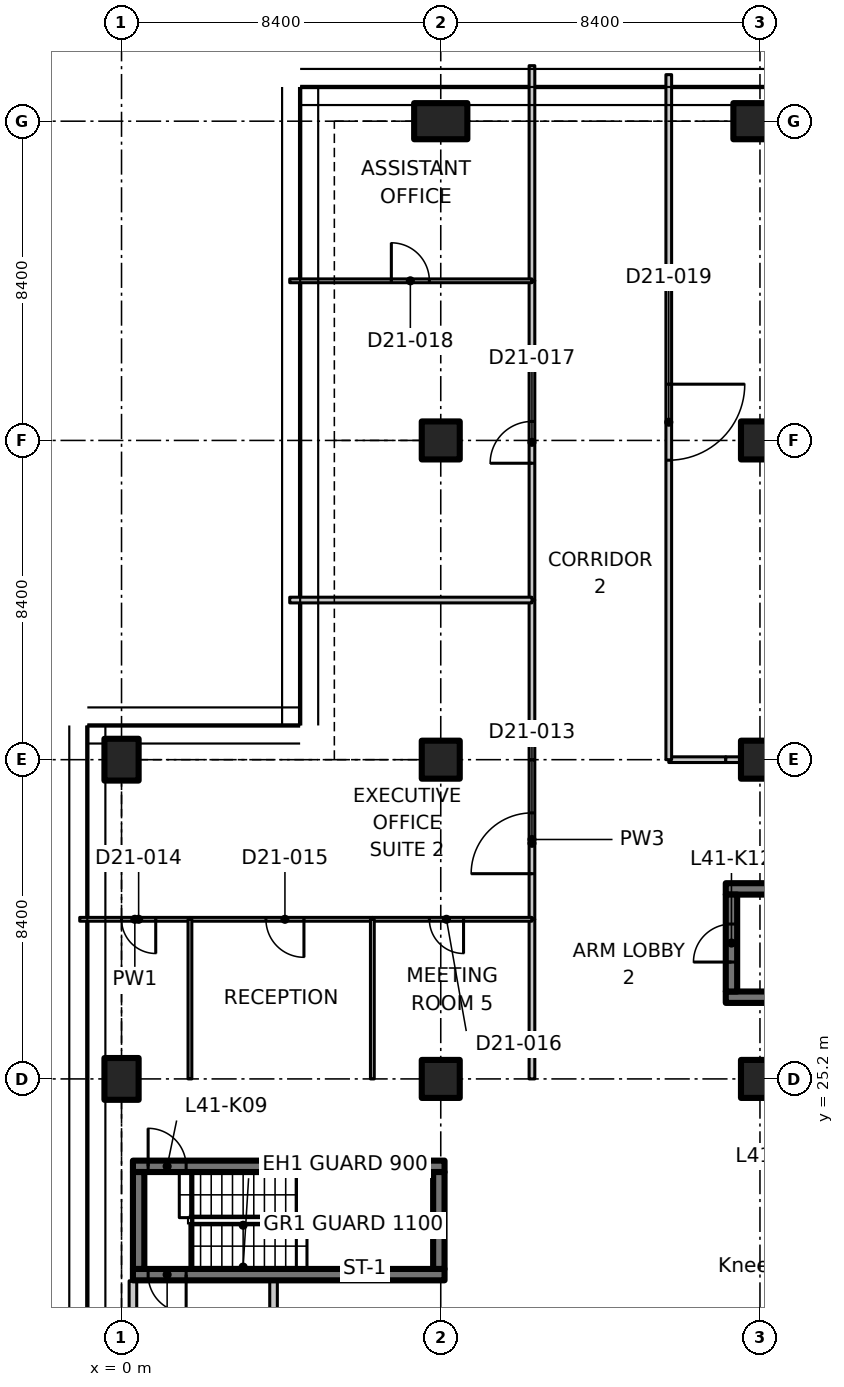
"""IFC4 building model, lengths in metres.
Left out: names, types, materials, properties, quantities, classifications, styles, units other than length and angle.
Written with IfcOpenShell. Run it as: python <this file> out.ifc"""

import sys

from ifc_helpers import new_model, si_unit, direction, frame, frame_2d, origin, origin_2d, place, context, subcontext, project, spatial, polyline, rectangle, outline, extrude, element, fill, save


model = new_model("IFC4")
c1 = context("Model", 3, precision=1e-05, world=origin(), true_north=direction((0.0, 1.0)))
c2 = subcontext(c1, "Body", "Model", "MODEL_VIEW")
j1 = project(units=[si_unit("LENGTHUNIT", "METRE"), si_unit("PLANEANGLEUNIT", "RADIAN")], contexts=[c1])
p1 = place(None, origin())
s1 = spatial("IfcSite", under=j1, at=p1, CompositionType="ELEMENT")
p2 = place(p1, origin())
s2 = spatial("IfcBuilding", under=s1, at=p2, CompositionType="ELEMENT")
p3 = place(p2, frame((0.0, 0.0, 166.8)))
s3 = spatial("IfcBuildingStorey", under=s2, at=p3, CompositionType="ELEMENT", Elevation=166.8)
for number, where, z_axis, x_axis in (
    (1, (0.0, 25.2, 0.0), (0.0, 0.0, 1.0), (1.0, 0.0, 0.0)),
    (2, (0.0, 33.6, 0.0), (0.0, 0.0, 1.0), (1.0, 0.0, 0.0)),
):
    element("IfcColumn", number, at=place(p3, frame(where, z_axis=z_axis, x_axis=x_axis)), inside=s3, PredefinedType="COLUMN", context=c2, shape_type="SweptSolid", body=[
        extrude(rectangle(XDim=0.9, YDim=1.1, at=origin_2d()), origin(), (0.0, 0.0, 1.0), 3.35),
    ])
for number, where, z_axis, x_axis in (
    (3, (8.4, 25.2, 0.0), (0.0, 0.0, 1.0), (1.0, 0.0, 0.0)),
    (4, (8.4, 33.6, 0.0), (0.0, 0.0, 1.0), (1.0, 0.0, 0.0)),
    (5, (8.4, 42.0, 0.0), (0.0, 0.0, 1.0), (1.0, 0.0, 0.0)),
):
    element("IfcColumn", number, at=place(p3, frame(where, z_axis=z_axis, x_axis=x_axis)), inside=s3, PredefinedType="COLUMN", context=c2, shape_type="SweptSolid", body=[
        extrude(rectangle(XDim=1.0, YDim=1.0, at=origin_2d()), origin(), (0.0, 0.0, 1.0), 3.35),
    ])
p4 = place(p3, frame((8.4, 50.4, 0.0), z_axis=(0.0, 0.0, 1.0), x_axis=(0.0, 1.0, 0.0)))
e6 = element("IfcColumn", 6, at=p4, inside=s3, PredefinedType="COLUMN", context=c2, shape_type="SweptSolid", body=[
    extrude(rectangle(XDim=0.95, YDim=1.4, at=origin_2d()), origin(), (0.0, 0.0, 1.0), 3.35),
])
for number, where, z_axis, x_axis in (
    (7, (16.8, 25.2, 0.0), (0.0, 0.0, 1.0), (1.0, 0.0, 0.0)),
    (8, (16.8, 33.6, 0.0), (0.0, 0.0, 1.0), (1.0, 0.0, 0.0)),
    (9, (16.8, 42.0, 0.0), (0.0, 0.0, 1.0), (1.0, 0.0, 0.0)),
):
    element("IfcColumn", number, at=place(p3, frame(where, z_axis=z_axis, x_axis=x_axis)), inside=s3, PredefinedType="COLUMN", context=c2, shape_type="SweptSolid", body=[
        extrude(rectangle(XDim=1.0, YDim=1.0, at=origin_2d()), origin(), (0.0, 0.0, 1.0), 3.35),
    ])
p5 = place(p3, frame((16.8, 50.4, 0.0), z_axis=(0.0, 0.0, 1.0), x_axis=(0.0, 1.0, 0.0)))
e10 = element("IfcColumn", 10, at=p5, inside=s3, PredefinedType="COLUMN", context=c2, shape_type="SweptSolid", body=[
    extrude(rectangle(XDim=0.95, YDim=1.4, at=origin_2d()), origin(), (0.0, 0.0, 1.0), 3.35),
])
p6 = place(p3, frame((8.5, 20.05, 0.0), z_axis=(0.0, 0.0, 1.0), x_axis=(-1.0, 0.0, 0.0)))
e11 = element("IfcWall", 11, at=p6, inside=s3, PredefinedType="SHEAR", context=c2, shape_type="SweptSolid", body=[
    extrude(rectangle(XDim=8.2, YDim=0.3, at=frame_2d((4.1, 0.0))), origin(), (0.0, 0.0, 1.0), 3.35),
])
p7 = place(p6, frame((6.8, 0.0, 0.0)))
e12 = element("IfcOpeningElement", 12, at=p7, cuts=e11, PredefinedType="OPENING", context=c2, shape_type="SweptSolid", body=[
    extrude(rectangle(XDim=1.0, YDim=2.1, at=frame_2d((0.5, 1.05))), frame((0.0, 0.16, 0.0), z_axis=(0.0, -1.0, 0.0), x_axis=(1.0, 0.0, 0.0)), (0.0, 0.0, 1.0), 0.32),
])
p8 = place(p3, frame((0.3, 22.9, 0.0), z_axis=(0.0, 0.0, 1.0), x_axis=(1.0, 0.0, 0.0)))
e13 = element("IfcWall", 13, at=p8, inside=s3, PredefinedType="SHEAR", context=c2, shape_type="SweptSolid", body=[
    extrude(rectangle(XDim=8.2, YDim=0.3, at=frame_2d((4.1, 0.0))), origin(), (0.0, 0.0, 1.0), 3.35),
])
p9 = place(p8, frame((0.4, 0.0, 0.0)))
e14 = element("IfcOpeningElement", 14, at=p9, cuts=e13, PredefinedType="OPENING", context=c2, shape_type="SweptSolid", body=[
    extrude(rectangle(XDim=1.0, YDim=2.1, at=frame_2d((0.5, 1.05))), frame((0.0, 0.16, 0.0), z_axis=(0.0, -1.0, 0.0), x_axis=(1.0, 0.0, 0.0)), (0.0, 0.0, 1.0), 0.32),
])
for number, where, z_axis, x_axis in (
    (15, (0.45, 20.2, 0.0), (0.0, 0.0, 1.0), (0.0, 1.0, 0.0)),
    (16, (8.35, 20.2, 0.0), (0.0, 0.0, 1.0), (0.0, 1.0, 0.0)),
):
    element("IfcWall", number, at=place(p3, frame(where, z_axis=z_axis, x_axis=x_axis)), inside=s3, PredefinedType="SHEAR", context=c2, shape_type="SweptSolid", body=[
        extrude(rectangle(XDim=2.55, YDim=0.3, at=frame_2d((1.275, 0.0))), origin(), (0.0, 0.0, 1.0), 3.35),
    ])
for number, where, z_axis, x_axis in (
    (17, (15.9, 27.35, 0.0), (0.0, 0.0, 1.0), (1.0, 0.0, 0.0)),
    (18, (15.9, 30.2, 0.0), (0.0, 0.0, 1.0), (1.0, 0.0, 0.0)),
):
    element("IfcWall", number, at=place(p3, frame(where, z_axis=z_axis, x_axis=x_axis)), inside=s3, PredefinedType="SHEAR", context=c2, shape_type="SweptSolid", body=[
        extrude(rectangle(XDim=8.2, YDim=0.3, at=frame_2d((4.1, 0.0))), origin(), (0.0, 0.0, 1.0), 3.35),
    ])
p10 = place(p3, frame((16.05, 27.5, 0.0), z_axis=(0.0, 0.0, 1.0), x_axis=(0.0, 1.0, 0.0)))
e19 = element("IfcWall", 19, at=p10, inside=s3, PredefinedType="SHEAR", context=c2, shape_type="SweptSolid", body=[
    extrude(rectangle(XDim=2.55, YDim=0.3, at=frame_2d((1.275, 0.0))), origin(), (0.0, 0.0, 1.0), 3.35),
])
p11 = place(p10, frame((0.775, 0.0, 0.0)))
e20 = element("IfcOpeningElement", 20, at=p11, cuts=e19, PredefinedType="OPENING", context=c2, shape_type="SweptSolid", body=[
    extrude(rectangle(XDim=1.0, YDim=2.1, at=frame_2d((0.5, 1.05))), frame((0.0, 0.16, 0.0), z_axis=(0.0, -1.0, 0.0), x_axis=(1.0, 0.0, 0.0)), (0.0, 0.0, 1.0), 0.32),
])
p12 = place(p3, frame((0.3, 16.812, 0.0), z_axis=(0.0, 0.0, 1.0), x_axis=(0.0, 1.0, 0.0)))
e21 = element("IfcWall", 21, at=p12, inside=s3, PredefinedType="PARTITIONING", context=c2, shape_type="SweptSolid", body=[
    extrude(rectangle(XDim=3.076, YDim=0.2, at=frame_2d((1.538, 0.0))), origin(), (0.0, 0.0, 1.0), 2.98),
])
p13 = place(p3, frame((4.0, 19.888, 0.0), z_axis=(0.0, 0.0, 1.0), x_axis=(0.0, -1.0, 0.0)))
e22 = element("IfcWall", 22, at=p13, inside=s3, PredefinedType="PARTITIONING", context=c2, shape_type="SweptSolid", body=[
    extrude(rectangle(XDim=3.076, YDim=0.2, at=frame_2d((1.538, 0.0))), origin(), (0.0, 0.0, 1.0), 3.35),
])
p14 = place(p13, frame((1.488, 0.0, 0.0)))
e23 = element("IfcOpeningElement", 23, at=p14, cuts=e22, PredefinedType="OPENING", context=c2, shape_type="SweptSolid", body=[
    extrude(rectangle(XDim=1.0, YDim=2.1, at=frame_2d((0.5, 1.05))), frame((0.0, 0.11, 0.0), z_axis=(0.0, -1.0, 0.0), x_axis=(1.0, 0.0, 0.0)), (0.0, 0.0, 1.0), 0.22),
])
p15 = place(p3, frame((10.8, 29.4, 0.0), z_axis=(0.0, 0.0, 1.0), x_axis=(0.0, 1.0, 0.0)))
e24 = element("IfcWall", 24, at=p15, inside=s3, PredefinedType="PARTITIONING", context=c2, shape_type="SweptSolid", body=[
    extrude(rectangle(XDim=4.2, YDim=0.15, at=frame_2d((2.1, 0.0))), origin(), (0.0, 0.0, 1.0), 3.33),
])
p16 = place(p15, frame((1.2, 0.0, 0.0)))
e25 = element("IfcOpeningElement", 25, at=p16, cuts=e24, PredefinedType="OPENING", context=c2, shape_type="SweptSolid", body=[
    extrude(rectangle(XDim=1.6, YDim=2.1, at=frame_2d((0.8, 1.05))), frame((0.0, 0.085, 0.0), z_axis=(0.0, -1.0, 0.0), x_axis=(1.0, 0.0, 0.0)), (0.0, 0.0, 1.0), 0.17),
])
p17 = place(p3, frame((10.8, 25.2, 0.0), z_axis=(0.0, 0.0, 1.0), x_axis=(0.0, 1.0, 0.0)))
e26 = element("IfcWall", 26, at=p17, inside=s3, PredefinedType="PARTITIONING", context=c2, shape_type="SweptSolid", body=[
    extrude(rectangle(XDim=4.2, YDim=0.15, at=frame_2d((2.1, 0.0))), origin(), (0.0, 0.0, 1.0), 3.33),
])
p18 = place(p3, frame((14.4, 33.6, 0.0), z_axis=(0.0, 0.0, 1.0), x_axis=(1.0, 0.0, 0.0)))
e27 = element("IfcWall", 27, at=p18, inside=s3, PredefinedType="PARTITIONING", context=c2, shape_type="SweptSolid", body=[
    extrude(rectangle(XDim=1.5, YDim=0.15, at=frame_2d((0.75, 0.0))), origin(), (0.0, 0.0, 1.0), 3.33),
])
p19 = place(p3, frame((15.9, 33.6, 0.0), z_axis=(0.0, 0.0, 1.0), x_axis=(1.0, 0.0, 0.0)))
e28 = element("IfcWall", 28, at=p19, inside=s3, PredefinedType="PARTITIONING", context=c2, shape_type="SweptSolid", body=[
    extrude(rectangle(XDim=0.38, YDim=0.15, at=frame_2d((0.19, 0.0))), origin(), (0.0, 0.0, 1.0), 3.33),
])
p20 = place(p3, frame((10.8, 33.6, 0.0), z_axis=(0.0, 0.0, 1.0), x_axis=(0.0, 1.0, 0.0)))
e29 = element("IfcWall", 29, at=p20, inside=s3, PredefinedType="PARTITIONING", context=c2, shape_type="SweptSolid", body=[
    extrude(rectangle(XDim=4.2, YDim=0.15, at=frame_2d((2.1, 0.0))), origin(), (0.0, 0.0, 1.0), 3.33),
])
p21 = place(p3, frame((10.8, 37.8, 0.0), z_axis=(0.0, 0.0, 1.0), x_axis=(0.0, 1.0, 0.0)))
e30 = element("IfcWall", 30, at=p21, inside=s3, PredefinedType="PARTITIONING", context=c2, shape_type="SweptSolid", body=[
    extrude(rectangle(XDim=8.4, YDim=0.15, at=frame_2d((4.2, 0.0))), origin(), (0.0, 0.0, 1.0), 3.33),
])
p22 = place(p21, frame((3.6, 0.0, 0.0)))
e31 = element("IfcOpeningElement", 31, at=p22, cuts=e30, PredefinedType="OPENING", context=c2, shape_type="SweptSolid", body=[
    extrude(rectangle(XDim=1.1, YDim=2.1, at=frame_2d((0.55, 1.05))), frame((0.0, 0.085, 0.0), z_axis=(0.0, -1.0, 0.0), x_axis=(1.0, 0.0, 0.0)), (0.0, 0.0, 1.0), 0.17),
])
p23 = place(p3, frame((10.8, 46.2, 0.0), z_axis=(0.0, 0.0, 1.0), x_axis=(0.0, 1.0, 0.0)))
e32 = element("IfcWall", 32, at=p23, inside=s3, PredefinedType="PARTITIONING", context=c2, shape_type="SweptSolid", body=[
    extrude(outline(polyline([(0.0, 0.0), (5.661, 0.0), (5.661, 3.33), (5.28, 3.33), (4.65, 3.33), (4.648, 2.98), (3.752, 2.98), (3.75, 3.33), (0.0, 3.33), (0.0, 0.0)])), frame((0.0, 0.075, 0.0), z_axis=(0.0, -1.0, 0.0), x_axis=(1.0, 0.0, 0.0)), (0.0, 0.0, 1.0), 0.15),
])
p24 = place(p3, frame((14.4, 51.625, 0.0), z_axis=(0.0, 0.0, 1.0), x_axis=(0.0, -1.0, 0.0)))
e33 = element("IfcWall", 33, at=p24, inside=s3, PredefinedType="PARTITIONING", context=c2, shape_type="SweptSolid", body=[
    extrude(outline(polyline([(0.0, 0.0), (18.025, 0.0), (18.025, 3.33), (1.675, 3.33), (1.673, 2.98), (0.777, 2.98), (0.775, 3.33), (0.145, 3.33), (0.0, 3.33), (0.0, 0.0)])), frame((0.0, 0.075, 0.0), z_axis=(0.0, -1.0, 0.0), x_axis=(1.0, 0.0, 0.0)), (0.0, 0.0, 1.0), 0.15),
])
p25 = place(p24, frame((8.145, 0.0, 0.0)))
e34 = element("IfcOpeningElement", 34, at=p25, cuts=e33, PredefinedType="OPENING", context=c2, shape_type="SweptSolid", body=[
    extrude(rectangle(XDim=2.0, YDim=2.4, at=frame_2d((1.0, 1.2))), frame((0.0, 0.085, 0.0), z_axis=(0.0, -1.0, 0.0), x_axis=(1.0, 0.0, 0.0)), (0.0, 0.0, 1.0), 0.17),
])
p26 = place(p3, frame((1.8, 29.4, 0.0), z_axis=(0.0, 0.0, 1.0), x_axis=(-1.0, 0.0, 0.0)))
e35 = element("IfcWall", 35, at=p26, inside=s3, PredefinedType="PARTITIONING", context=c2, shape_type="SweptSolid", body=[
    extrude(rectangle(XDim=2.9, YDim=0.1, at=frame_2d((1.45, 0.0))), origin(), (0.0, 0.0, 1.0), 2.98),
])
p27 = place(p26, frame((0.9, 0.0, 0.0)))
e36 = element("IfcOpeningElement", 36, at=p27, cuts=e35, PredefinedType="OPENING", context=c2, shape_type="SweptSolid", body=[
    extrude(rectangle(XDim=0.9, YDim=2.1, at=frame_2d((0.45, 1.05))), frame((0.0, 0.06, 0.0), z_axis=(0.0, -1.0, 0.0), x_axis=(1.0, 0.0, 0.0)), (0.0, 0.0, 1.0), 0.12),
])
p28 = place(p3, frame((6.6, 29.4, 0.0), z_axis=(0.0, 0.0, 1.0), x_axis=(-1.0, 0.0, 0.0)))
e37 = element("IfcWall", 37, at=p28, inside=s3, PredefinedType="PARTITIONING", context=c2, shape_type="SweptSolid", body=[
    extrude(rectangle(XDim=4.8, YDim=0.1, at=frame_2d((2.4, 0.0))), origin(), (0.0, 0.0, 1.0), 3.33),
])
p29 = place(p28, frame((1.8, 0.0, 0.0)))
e38 = element("IfcOpeningElement", 38, at=p29, cuts=e37, PredefinedType="OPENING", context=c2, shape_type="SweptSolid", body=[
    extrude(rectangle(XDim=1.0, YDim=2.1, at=frame_2d((0.5, 1.05))), frame((0.0, 0.06, 0.0), z_axis=(0.0, -1.0, 0.0), x_axis=(1.0, 0.0, 0.0)), (0.0, 0.0, 1.0), 0.12),
])
p30 = place(p3, frame((10.8, 29.4, 0.0), z_axis=(0.0, 0.0, 1.0), x_axis=(-1.0, 0.0, 0.0)))
e39 = element("IfcWall", 39, at=p30, inside=s3, PredefinedType="PARTITIONING", context=c2, shape_type="SweptSolid", body=[
    extrude(rectangle(XDim=4.2, YDim=0.1, at=frame_2d((2.1, 0.0))), origin(), (0.0, 0.0, 1.0), 3.33),
])
p31 = place(p30, frame((1.8, 0.0, 0.0)))
e40 = element("IfcOpeningElement", 40, at=p31, cuts=e39, PredefinedType="OPENING", context=c2, shape_type="SweptSolid", body=[
    extrude(rectangle(XDim=0.9, YDim=2.1, at=frame_2d((0.45, 1.05))), frame((0.0, 0.06, 0.0), z_axis=(0.0, -1.0, 0.0), x_axis=(1.0, 0.0, 0.0)), (0.0, 0.0, 1.0), 0.12),
])
p32 = place(p3, frame((4.426, 37.8, 0.0), z_axis=(0.0, 0.0, 1.0), x_axis=(1.0, 0.0, 0.0)))
e41 = element("IfcWall", 41, at=p32, inside=s3, PredefinedType="PARTITIONING", context=c2, shape_type="SweptSolid", body=[
    extrude(outline(polyline([(0.0, 0.0), (6.374, 0.0), (6.374, 3.33), (1.624, 3.33), (1.622, 2.98), (0.726, 2.98), (0.724, 3.33), (0.074, 3.33), (0.0, 3.33), (0.0, 0.0)])), frame((0.0, 0.075, 0.0), z_axis=(0.0, -1.0, 0.0), x_axis=(1.0, 0.0, 0.0)), (0.0, 0.0, 1.0), 0.15),
])
for number, where, z_axis, x_axis in (
    (42, (1.8, 29.4, 0.0), (0.0, 0.0, 1.0), (0.0, -1.0, 0.0)),
    (43, (6.6, 29.4, 0.0), (0.0, 0.0, 1.0), (0.0, -1.0, 0.0)),
):
    element("IfcWall", number, at=place(p3, frame(where, z_axis=z_axis, x_axis=x_axis)), inside=s3, PredefinedType="PARTITIONING", context=c2, shape_type="SweptSolid", body=[
        extrude(rectangle(XDim=4.2, YDim=0.1, at=frame_2d((2.1, 0.0))), origin(), (0.0, 0.0, 1.0), 3.33),
    ])
p33 = place(p3, frame((4.426, 46.2, 0.0), z_axis=(0.0, 0.0, 1.0), x_axis=(1.0, 0.0, 0.0)))
e44 = element("IfcWall", 44, at=p33, inside=s3, PredefinedType="PARTITIONING", context=c2, shape_type="SweptSolid", body=[
    extrude(outline(polyline([(0.0, 0.0), (6.374, 0.0), (6.374, 3.33), (1.624, 3.33), (1.622, 2.98), (0.726, 2.98), (0.724, 3.33), (0.074, 3.33), (0.0, 3.33), (0.0, 0.0)])), frame((0.0, 0.05, 0.0), z_axis=(0.0, -1.0, 0.0), x_axis=(1.0, 0.0, 0.0)), (0.0, 0.0, 1.0), 0.1),
])
p34 = place(p33, frame((2.674, 0.0, 0.0)))
e45 = element("IfcOpeningElement", 45, at=p34, cuts=e44, PredefinedType="OPENING", context=c2, shape_type="SweptSolid", body=[
    extrude(rectangle(XDim=1.0, YDim=2.1, at=frame_2d((0.5, 1.05))), frame((0.0, 0.06, 0.0), z_axis=(0.0, -1.0, 0.0), x_axis=(1.0, 0.0, 0.0)), (0.0, 0.0, 1.0), 0.12),
])
p35 = place(p7, origin())
e46 = element("IfcDoor", 46, at=p35, inside=s3, OperationType="SINGLE_SWING_RIGHT", PredefinedType="DOOR", context=c2, shape_type="SweptSolid", body=[
    extrude(rectangle(XDim=1.0, YDim=2.1, at=frame_2d((0.5, 1.05))), frame((0.0, 0.025, 0.0), z_axis=(0.0, -1.0, 0.0), x_axis=(1.0, 0.0, 0.0)), (0.0, 0.0, 1.0), 0.05),
])
fill(e12, e46)
p36 = place(p9, origin())
e47 = element("IfcDoor", 47, at=p36, inside=s3, OperationType="SINGLE_SWING_LEFT", PredefinedType="DOOR", context=c2, shape_type="SweptSolid", body=[
    extrude(rectangle(XDim=1.0, YDim=2.1, at=frame_2d((0.5, 1.05))), frame((0.0, 0.025, 0.0), z_axis=(0.0, -1.0, 0.0), x_axis=(1.0, 0.0, 0.0)), (0.0, 0.0, 1.0), 0.05),
])
fill(e14, e47)
p37 = place(p11, origin())
e48 = element("IfcDoor", 48, at=p37, inside=s3, OperationType="SINGLE_SWING_RIGHT", PredefinedType="DOOR", context=c2, shape_type="SweptSolid", body=[
    extrude(rectangle(XDim=1.0, YDim=2.1, at=frame_2d((0.5, 1.05))), frame((0.0, 0.025, 0.0), z_axis=(0.0, -1.0, 0.0), x_axis=(1.0, 0.0, 0.0)), (0.0, 0.0, 1.0), 0.05),
])
fill(e20, e48)
p38 = place(p16, origin())
e49 = element("IfcDoor", 49, at=p38, inside=s3, OperationType="DOUBLE_DOOR_SINGLE_SWING", PredefinedType="DOOR", context=c2, shape_type="SweptSolid", body=[
    extrude(rectangle(XDim=1.6, YDim=2.1, at=frame_2d((0.8, 1.05))), frame((0.0, 0.025, 0.0), z_axis=(0.0, -1.0, 0.0), x_axis=(1.0, 0.0, 0.0)), (0.0, 0.0, 1.0), 0.05),
])
fill(e25, e49)
p39 = place(p27, origin())
e50 = element("IfcDoor", 50, at=p39, inside=s3, OperationType="SINGLE_SWING_LEFT", PredefinedType="DOOR", context=c2, shape_type="SweptSolid", body=[
    extrude(rectangle(XDim=0.9, YDim=2.1, at=frame_2d((0.45, 1.05))), frame((0.0, 0.025, 0.0), z_axis=(0.0, -1.0, 0.0), x_axis=(1.0, 0.0, 0.0)), (0.0, 0.0, 1.0), 0.05),
])
fill(e36, e50)
p40 = place(p29, origin())
e51 = element("IfcDoor", 51, at=p40, inside=s3, OperationType="SINGLE_SWING_LEFT", PredefinedType="DOOR", context=c2, shape_type="SweptSolid", body=[
    extrude(rectangle(XDim=1.0, YDim=2.1, at=frame_2d((0.5, 1.05))), frame((0.0, 0.025, 0.0), z_axis=(0.0, -1.0, 0.0), x_axis=(1.0, 0.0, 0.0)), (0.0, 0.0, 1.0), 0.05),
])
fill(e38, e51)
p41 = place(p31, origin())
e52 = element("IfcDoor", 52, at=p41, inside=s3, OperationType="SINGLE_SWING_LEFT", PredefinedType="DOOR", context=c2, shape_type="SweptSolid", body=[
    extrude(rectangle(XDim=0.9, YDim=2.1, at=frame_2d((0.45, 1.05))), frame((0.0, 0.025, 0.0), z_axis=(0.0, -1.0, 0.0), x_axis=(1.0, 0.0, 0.0)), (0.0, 0.0, 1.0), 0.05),
])
fill(e40, e52)
p42 = place(p22, origin())
e53 = element("IfcDoor", 53, at=p42, inside=s3, OperationType="SINGLE_SWING_LEFT", PredefinedType="DOOR", context=c2, shape_type="SweptSolid", body=[
    extrude(rectangle(XDim=1.1, YDim=2.1, at=frame_2d((0.55, 1.05))), frame((0.0, 0.025, 0.0), z_axis=(0.0, -1.0, 0.0), x_axis=(1.0, 0.0, 0.0)), (0.0, 0.0, 1.0), 0.05),
])
fill(e31, e53)
p43 = place(p34, origin())
e54 = element("IfcDoor", 54, at=p43, inside=s3, OperationType="SINGLE_SWING_LEFT", PredefinedType="DOOR", context=c2, shape_type="SweptSolid", body=[
    extrude(rectangle(XDim=1.0, YDim=2.1, at=frame_2d((0.5, 1.05))), frame((0.0, 0.025, 0.0), z_axis=(0.0, -1.0, 0.0), x_axis=(1.0, 0.0, 0.0)), (0.0, 0.0, 1.0), 0.05),
])
fill(e45, e54)
p44 = place(p25, origin())
e55 = element("IfcDoor", 55, at=p44, inside=s3, OperationType="DOUBLE_DOOR_SINGLE_SWING", PredefinedType="DOOR", context=c2, shape_type="SweptSolid", body=[
    extrude(rectangle(XDim=2.0, YDim=2.4, at=frame_2d((1.0, 1.2))), frame((0.0, 0.025, 0.0), z_axis=(0.0, -1.0, 0.0), x_axis=(1.0, 0.0, 0.0)), (0.0, 0.0, 1.0), 0.05),
])
fill(e34, e55)
save(model, sys.argv[1])
